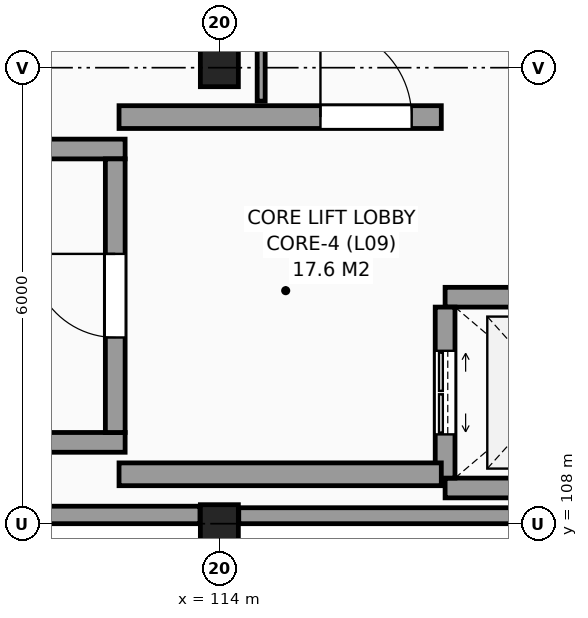
"""IFC4 building model, lengths in metres.
Left out: names, types, materials, properties, quantities, classifications, styles, units other than length and angle.
Written with IfcOpenShell. Run it as: python <this file> out.ifc"""

import sys

from ifc_helpers import new_model, si_unit, direction, frame, frame_2d, origin, origin_2d, place, context, subcontext, project, spatial, rectangle, extrude, element, fill, save


model = new_model("IFC4")
c1 = context("Model", 3, precision=1e-05, world=origin(), true_north=direction((0.0, 1.0)))
c2 = subcontext(c1, "Body", "Model", "MODEL_VIEW")
j1 = project(units=[si_unit("LENGTHUNIT", "METRE"), si_unit("PLANEANGLEUNIT", "RADIAN")], contexts=[c1])
p1 = place(None, origin())
s1 = spatial("IfcSite", under=j1, at=p1, CompositionType="ELEMENT")
p2 = place(p1, origin())
s2 = spatial("IfcBuilding", under=s1, at=p2, CompositionType="ELEMENT")
p3 = place(p2, frame((0.0, 0.0, 38.1)))
s3 = spatial("IfcBuildingStorey", under=s2, at=p3, CompositionType="ELEMENT", Elevation=38.1)
for number, where, z_axis, x_axis in (
    (1, (114.0, 108.0, 0.0), (0.0, 0.0, 1.0), (1.0, 0.0, 0.0)),
    (2, (114.0, 114.0, 0.0), (0.0, 0.0, 1.0), (1.0, 0.0, 0.0)),
):
    element("IfcColumn", number, at=place(p3, frame(where, z_axis=z_axis, x_axis=x_axis)), inside=s3, PredefinedType="COLUMN", context=c2, shape_type="SweptSolid", body=[
        extrude(rectangle(XDim=0.5, YDim=0.5, at=origin_2d()), origin(), (0.0, 0.0, 1.0), 3.3),
    ])
p4 = place(p3, frame((108.255, 108.115, 0.0), z_axis=(0.0, 0.0, 1.0), x_axis=(1.0, 0.0, 0.0)))
e3 = element("IfcWall", 3, at=p4, inside=s3, PredefinedType="SOLIDWALL", context=c2, shape_type="SweptSolid", body=[
    extrude(rectangle(XDim=5.49, YDim=0.23, at=frame_2d((2.745, 0.0))), origin(), (0.0, 0.0, 1.0), 2.41),
])
p5 = place(p3, frame((114.255, 108.105, 0.0), z_axis=(0.0, 0.0, 1.0), x_axis=(1.0, 0.0, 0.0)))
e4 = element("IfcWall", 4, at=p5, inside=s3, PredefinedType="SOLIDWALL", context=c2, shape_type="SweptSolid", body=[
    extrude(rectangle(XDim=5.49, YDim=0.21, at=frame_2d((2.745, 0.0))), origin(), (0.0, 0.0, 1.0), 2.41),
])
for number, where, z_axis, x_axis in (
    (5, (102.04, 109.07, 0.0), (0.0, 0.0, 1.0), (1.0, 0.0, 0.0)),
    (6, (102.04, 112.93, 0.0), (0.0, 0.0, 1.0), (1.0, 0.0, 0.0)),
):
    element("IfcWall", number, at=place(p3, frame(where, z_axis=z_axis, x_axis=x_axis)), inside=s3, PredefinedType="SHEAR", context=c2, shape_type="SweptSolid", body=[
        extrude(rectangle(XDim=10.72, YDim=0.26, at=frame_2d((5.36, 0.0))), origin(), (0.0, 0.0, 1.0), 3.3),
    ])
p6 = place(p3, frame((112.63, 109.2, 0.0), z_axis=(0.0, 0.0, 1.0), x_axis=(0.0, 1.0, 0.0)))
e7 = element("IfcWall", 7, at=p6, inside=s3, PredefinedType="SHEAR", context=c2, shape_type="SweptSolid", body=[
    extrude(rectangle(XDim=3.6, YDim=0.26, at=frame_2d((1.8, 0.0))), origin(), (0.0, 0.0, 1.0), 3.3),
])
p7 = place(p6, frame((1.25, 0.0, 0.0)))
e8 = element("IfcOpeningElement", 8, at=p7, cuts=e7, PredefinedType="OPENING", context=c2, shape_type="SweptSolid", body=[
    extrude(rectangle(XDim=1.1, YDim=2.15, at=frame_2d((0.55, 1.075))), frame((0.0, 0.14, 0.0), z_axis=(0.0, -1.0, 0.0), x_axis=(1.0, 0.0, 0.0)), (0.0, 0.0, 1.0), 0.28),
])
for number, where, z_axis, x_axis in (
    (9, (116.97, 108.47, 0.0), (0.0, 0.0, 1.0), (1.0, 0.0, 0.0)),
    (10, (116.97, 110.98, 0.0), (0.0, 0.0, 1.0), (1.0, 0.0, 0.0)),
):
    element("IfcWall", number, at=place(p3, frame(where, z_axis=z_axis, x_axis=x_axis)), inside=s3, PredefinedType="SHEAR", context=c2, shape_type="SweptSolid", body=[
        extrude(rectangle(XDim=2.91, YDim=0.26, at=frame_2d((1.455, 0.0))), origin(), (0.0, 0.0, 1.0), 3.3),
    ])
p8 = place(p3, frame((116.97, 108.6, 0.0), z_axis=(0.0, 0.0, 1.0), x_axis=(0.0, 1.0, 0.0)))
e11 = element("IfcWall", 11, at=p8, inside=s3, PredefinedType="SHEAR", context=c2, shape_type="SweptSolid", body=[
    extrude(rectangle(XDim=2.25, YDim=0.26, at=frame_2d((1.125, 0.0))), origin(), (0.0, 0.0, 1.0), 3.3),
])
p9 = place(p8, frame((0.575, 0.0, 0.0)))
e12 = element("IfcOpeningElement", 12, at=p9, cuts=e11, PredefinedType="OPENING", context=c2, shape_type="SweptSolid", body=[
    extrude(rectangle(XDim=1.1, YDim=2.2, at=frame_2d((0.55, 1.1))), frame((0.0, 0.14, 0.0), z_axis=(0.0, -1.0, 0.0), x_axis=(1.0, 0.0, 0.0)), (0.0, 0.0, 1.0), 0.28),
])
p10 = place(p3, frame((112.68, 113.35, 0.0), z_axis=(0.0, 0.0, 1.0), x_axis=(1.0, 0.0, 0.0)))
e13 = element("IfcWall", 13, at=p10, inside=s3, PredefinedType="SHEAR", context=c2, shape_type="SweptSolid", body=[
    extrude(rectangle(XDim=4.24, YDim=0.3, at=frame_2d((2.12, 0.0))), origin(), (0.0, 0.0, 1.0), 3.3),
])
p11 = place(p10, frame((2.65, 0.0, 0.0)))
e14 = element("IfcOpeningElement", 14, at=p11, cuts=e13, PredefinedType="OPENING", context=c2, shape_type="SweptSolid", body=[
    extrude(rectangle(XDim=1.2, YDim=2.2, at=frame_2d((0.6, 1.1))), frame((0.0, 0.16, 0.0), z_axis=(0.0, -1.0, 0.0), x_axis=(1.0, 0.0, 0.0)), (0.0, 0.0, 1.0), 0.32),
])
p12 = place(p3, frame((112.68, 108.65, 0.0), z_axis=(0.0, 0.0, 1.0), x_axis=(1.0, 0.0, 0.0)))
e15 = element("IfcWall", 15, at=p12, inside=s3, PredefinedType="SHEAR", context=c2, shape_type="SweptSolid", body=[
    extrude(rectangle(XDim=4.24, YDim=0.3, at=frame_2d((2.12, 0.0))), origin(), (0.0, 0.0, 1.0), 3.3),
])
p13 = place(p3, frame((114.55, 113.56, 0.0), z_axis=(0.0, 0.0, 1.0), x_axis=(0.0, 1.0, 0.0)))
e16 = element("IfcWall", 16, at=p13, inside=s3, PredefinedType="PARTITIONING", context=c2, shape_type="SweptSolid", body=[
    extrude(rectangle(XDim=2.24, YDim=0.105, at=frame_2d((1.12, 0.0))), origin(), (0.0, 0.0, 1.0), 3.06),
])
p14 = place(p7, origin())
e17 = element("IfcDoor", 17, at=p14, inside=s3, OperationType="SINGLE_SWING_RIGHT", PredefinedType="DOOR", context=c2, shape_type="SweptSolid", body=[
    extrude(rectangle(XDim=1.1, YDim=2.15, at=frame_2d((0.55, 1.075))), frame((0.0, 0.025, 0.0), z_axis=(0.0, -1.0, 0.0), x_axis=(1.0, 0.0, 0.0)), (0.0, 0.0, 1.0), 0.05),
])
fill(e8, e17)
p15 = place(p9, origin())
e18 = element("IfcDoor", 18, at=p15, inside=s3, OperationType="DOUBLE_DOOR_SLIDING", PredefinedType="DOOR", context=c2, shape_type="SweptSolid", body=[
    extrude(rectangle(XDim=1.1, YDim=2.2, at=frame_2d((0.55, 1.1))), frame((0.0, 0.025, 0.0), z_axis=(0.0, -1.0, 0.0), x_axis=(1.0, 0.0, 0.0)), (0.0, 0.0, 1.0), 0.05),
])
fill(e12, e18)
p16 = place(p11, origin())
e19 = element("IfcDoor", 19, at=p16, inside=s3, OperationType="SINGLE_SWING_LEFT", PredefinedType="DOOR", context=c2, shape_type="SweptSolid", body=[
    extrude(rectangle(XDim=1.2, YDim=2.2, at=frame_2d((0.6, 1.1))), frame((0.0, 0.025, 0.0), z_axis=(0.0, -1.0, 0.0), x_axis=(1.0, 0.0, 0.0)), (0.0, 0.0, 1.0), 0.05),
])
fill(e14, e19)
save(model, sys.argv[1])
